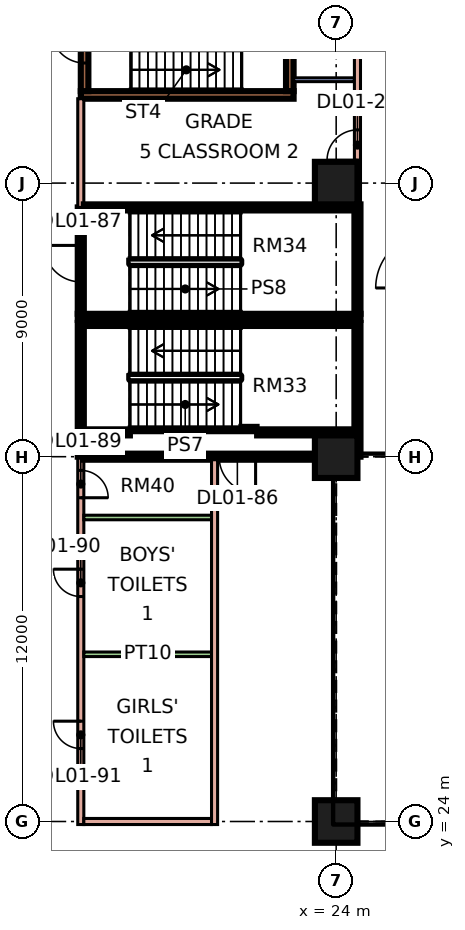
"""IFC4 building model, lengths in metres.
Left out: names, types, materials, properties, quantities, classifications, styles, units other than length and angle.
Written with IfcOpenShell. Run it as: python <this file> out.ifc"""

import sys

from ifc_helpers import new_model, si_unit, direction, frame, frame_2d, origin, origin_2d, place, context, subcontext, project, spatial, rectangle, extrude, element, fill, save


model = new_model("IFC4")
c1 = context("Model", 3, precision=1e-05, world=origin(), true_north=direction((0.0, 1.0)))
c2 = subcontext(c1, "Body", "Model", "MODEL_VIEW")
j1 = project(units=[si_unit("LENGTHUNIT", "METRE"), si_unit("PLANEANGLEUNIT", "RADIAN")], contexts=[c1])
p1 = place(None, origin())
s1 = spatial("IfcSite", under=j1, at=p1, CompositionType="ELEMENT")
p2 = place(p1, origin())
s2 = spatial("IfcBuilding", under=s1, at=p2, CompositionType="ELEMENT")
p3 = place(p2, frame((0.0, 0.0, 7.2)))
s3 = spatial("IfcBuildingStorey", under=s2, at=p3, CompositionType="ELEMENT", Elevation=7.2)
for number, where, z_axis, x_axis in (
    (1, (24.0, 24.0, 0.0), (0.0, 0.0, 1.0), (1.0, 0.0, 0.0)),
    (2, (24.0, 36.0, 0.0), (0.0, 0.0, 1.0), (1.0, 0.0, 0.0)),
    (3, (24.0, 45.0, 0.0), (0.0, 0.0, 1.0), (1.0, 0.0, 0.0)),
):
    element("IfcColumn", number, at=place(p3, frame(where, z_axis=z_axis, x_axis=x_axis)), inside=s3, PredefinedType="COLUMN", context=c2, shape_type="SweptSolid", body=[
        extrude(rectangle(XDim=1.4, YDim=1.4, at=origin_2d()), origin(), (0.0, 0.0, 1.0), 4.8),
    ])
p4 = place(p3, frame((15.6, 47.9, 0.0), z_axis=(0.0, 0.0, 1.0), x_axis=(1.0, 0.0, 0.0)))
e4 = element("IfcWall", 4, at=p4, inside=s3, PredefinedType="SHEAR", context=c2, shape_type="SweptSolid", body=[
    extrude(rectangle(XDim=7.0, YDim=0.25, at=frame_2d((3.5, 0.0))), origin(), (0.0, 0.0, 1.0), 4.8),
])
p5 = place(p3, frame((15.725, 48.025, 0.0), z_axis=(0.0, 0.0, 1.0), x_axis=(0.0, 1.0, 0.0)))
e5 = element("IfcWall", 5, at=p5, inside=s3, PredefinedType="SHEAR", context=c2, shape_type="SweptSolid", body=[
    extrude(rectangle(XDim=2.95, YDim=0.25, at=frame_2d((1.475, 0.0))), origin(), (0.0, 0.0, 1.0), 4.8),
])
p6 = place(p5, frame((0.925, 0.0, 0.0)))
e6 = element("IfcOpeningElement", 6, at=p6, cuts=e5, PredefinedType="OPENING", context=c2, shape_type="SweptSolid", body=[
    extrude(rectangle(XDim=1.1, YDim=2.2, at=frame_2d((0.55, 1.1))), frame((0.0, 0.135, 0.0), z_axis=(0.0, -1.0, 0.0), x_axis=(1.0, 0.0, 0.0)), (0.0, 0.0, 1.0), 0.27),
])
p7 = place(p3, frame((22.475, 48.025, 0.0), z_axis=(0.0, 0.0, 1.0), x_axis=(0.0, 1.0, 0.0)))
e7 = element("IfcWall", 7, at=p7, inside=s3, PredefinedType="SHEAR", context=c2, shape_type="SweptSolid", body=[
    extrude(rectangle(XDim=2.95, YDim=0.25, at=frame_2d((1.475, 0.0))), origin(), (0.0, 0.0, 1.0), 4.8),
])
p8 = place(p3, frame((15.5, 40.6, 0.0), z_axis=(0.0, 0.0, 1.0), x_axis=(1.0, 0.0, 0.0)))
e8 = element("IfcWall", 8, at=p8, inside=s3, PredefinedType="SOLIDWALL", context=c2, shape_type="SweptSolid", body=[
    extrude(rectangle(XDim=9.3, YDim=0.2, at=frame_2d((4.65, 0.0))), origin(), (0.0, 0.0, 1.0), 4.4),
])
p9 = place(p3, frame((15.6, 23.9, 0.0), z_axis=(0.0, 0.0, 1.0), x_axis=(0.0, 1.0, 0.0)))
e9 = element("IfcWall", 9, at=p9, inside=s3, PredefinedType="PARTITIONING", context=c2, shape_type="SweptSolid", body=[
    extrude(rectangle(XDim=12.1, YDim=0.2, at=frame_2d((6.05, 0.0))), origin(), (0.0, 0.0, 1.0), 4.4),
])
p10 = place(p9, frame((10.75, 0.0, 0.0)))
e10 = element("IfcOpeningElement", 10, at=p10, cuts=e9, PredefinedType="OPENING", context=c2, shape_type="SweptSolid", body=[
    extrude(rectangle(XDim=0.9, YDim=2.1, at=frame_2d((0.45, 1.05))), frame((0.0, 0.11, 0.0), z_axis=(0.0, -1.0, 0.0), x_axis=(1.0, 0.0, 0.0)), (0.0, 0.0, 1.0), 0.22),
])
p11 = place(p9, frame((7.5, 0.0, 0.0)))
e11 = element("IfcOpeningElement", 11, at=p11, cuts=e9, PredefinedType="OPENING", context=c2, shape_type="SweptSolid", body=[
    extrude(rectangle(XDim=0.9, YDim=2.1, at=frame_2d((0.45, 1.05))), frame((0.0, 0.11, 0.0), z_axis=(0.0, -1.0, 0.0), x_axis=(1.0, 0.0, 0.0)), (0.0, 0.0, 1.0), 0.22),
])
p12 = place(p9, frame((2.5, 0.0, 0.0)))
e12 = element("IfcOpeningElement", 12, at=p12, cuts=e9, PredefinedType="OPENING", context=c2, shape_type="SweptSolid", body=[
    extrude(rectangle(XDim=0.9, YDim=2.1, at=frame_2d((0.45, 1.05))), frame((0.0, 0.11, 0.0), z_axis=(0.0, -1.0, 0.0), x_axis=(1.0, 0.0, 0.0)), (0.0, 0.0, 1.0), 0.22),
])
p13 = place(p3, frame((15.6, 36.0, 0.0), z_axis=(0.0, 0.0, 1.0), x_axis=(0.0, 1.0, 0.0)))
e13 = element("IfcWall", 13, at=p13, inside=s3, PredefinedType="SOLIDWALL", context=c2, shape_type="SweptSolid", body=[
    extrude(rectangle(XDim=4.4, YDim=0.2, at=frame_2d((2.2, 0.0))), origin(), (0.0, 0.0, 1.0), 4.4),
])
p14 = place(p3, frame((15.6, 40.7, 0.0), z_axis=(0.0, 0.0, 1.0), x_axis=(0.0, 1.0, 0.0)))
e14 = element("IfcWall", 14, at=p14, inside=s3, PredefinedType="SOLIDWALL", context=c2, shape_type="SweptSolid", body=[
    extrude(rectangle(XDim=3.5, YDim=0.2, at=frame_2d((1.75, 0.0))), origin(), (0.0, 0.0, 1.0), 4.4),
])
p15 = place(p14, frame((1.05, 0.0, 0.0)))
e15 = element("IfcOpeningElement", 15, at=p15, cuts=e14, PredefinedType="OPENING", context=c2, shape_type="SweptSolid", body=[
    extrude(rectangle(XDim=1.2, YDim=2.1, at=frame_2d((0.6, 1.05))), frame((0.0, 0.11, 0.0), z_axis=(0.0, -1.0, 0.0), x_axis=(1.0, 0.0, 0.0)), (0.0, 0.0, 1.0), 0.22),
])
p16 = place(p3, frame((15.6, 44.2, 0.0), z_axis=(0.0, 0.0, 1.0), x_axis=(0.0, 1.0, 0.0)))
e16 = element("IfcWall", 16, at=p16, inside=s3, PredefinedType="PARTITIONING", context=c2, shape_type="SweptSolid", body=[
    extrude(rectangle(XDim=3.575, YDim=0.2, at=frame_2d((1.788, 0.0))), origin(), (0.0, 0.0, 1.0), 4.4),
])
p17 = place(p3, frame((15.7, 24.0, 0.0), z_axis=(0.0, 0.0, 1.0), x_axis=(1.0, 0.0, 0.0)))
e17 = element("IfcWall", 17, at=p17, inside=s3, PredefinedType="PARTITIONING", context=c2, shape_type="SweptSolid", body=[
    extrude(rectangle(XDim=4.2, YDim=0.2, at=frame_2d((2.1, 0.0))), origin(), (0.0, 0.0, 1.0), 4.4),
])
for number, where, z_axis, x_axis in (
    (18, (15.7, 29.5, 0.0), (0.0, 0.0, 1.0), (1.0, 0.0, 0.0)),
    (19, (15.7, 34.0, 0.0), (0.0, 0.0, 1.0), (1.0, 0.0, 0.0)),
):
    element("IfcWall", number, at=place(p3, frame(where, z_axis=z_axis, x_axis=x_axis)), inside=s3, PredefinedType="PARTITIONING", context=c2, shape_type="SweptSolid", body=[
        extrude(rectangle(XDim=4.2, YDim=0.15, at=frame_2d((2.1, 0.0))), origin(), (0.0, 0.0, 1.0), 4.4),
    ])
p18 = place(p3, frame((15.7, 36.0, 0.0), z_axis=(0.0, 0.0, 1.0), x_axis=(1.0, 0.0, 0.0)))
e20 = element("IfcWall", 20, at=p18, inside=s3, PredefinedType="SOLIDWALL", context=c2, shape_type="SweptSolid", body=[
    extrude(rectangle(XDim=8.3, YDim=0.2, at=frame_2d((4.15, 0.0))), origin(), (0.0, 0.0, 1.0), 4.4),
])
p19 = place(p18, frame((4.45, 0.0, 0.0)))
e21 = element("IfcOpeningElement", 21, at=p19, cuts=e20, PredefinedType="OPENING", context=c2, shape_type="SweptSolid", body=[
    extrude(rectangle(XDim=1.2, YDim=2.1, at=frame_2d((0.6, 1.05))), frame((0.0, 0.11, 0.0), z_axis=(0.0, -1.0, 0.0), x_axis=(1.0, 0.0, 0.0)), (0.0, 0.0, 1.0), 0.22),
])
p20 = place(p3, frame((15.7, 44.2, 0.0), z_axis=(0.0, 0.0, 1.0), x_axis=(1.0, 0.0, 0.0)))
e22 = element("IfcWall", 22, at=p20, inside=s3, PredefinedType="SOLIDWALL", context=c2, shape_type="SweptSolid", body=[
    extrude(rectangle(XDim=8.9, YDim=0.2, at=frame_2d((4.45, 0.0))), origin(), (0.0, 0.0, 1.0), 4.4),
])
p21 = place(p3, frame((20.0, 23.9, 0.0), z_axis=(0.0, 0.0, 1.0), x_axis=(0.0, 1.0, 0.0)))
e23 = element("IfcWall", 23, at=p21, inside=s3, PredefinedType="PARTITIONING", context=c2, shape_type="SweptSolid", body=[
    extrude(rectangle(XDim=12.0, YDim=0.2, at=frame_2d((6.0, 0.0))), origin(), (0.0, 0.0, 1.0), 4.4),
])
p22 = place(p3, frame((22.6, 48.4, 0.0), z_axis=(0.0, 0.0, 1.0), x_axis=(1.0, 0.0, 0.0)))
e24 = element("IfcWall", 24, at=p22, inside=s3, PredefinedType="PARTITIONING", context=c2, shape_type="SweptSolid", body=[
    extrude(rectangle(XDim=2.0, YDim=0.125, at=frame_2d((1.0, 0.0))), origin(), (0.0, 0.0, 1.0), 4.4),
])
p23 = place(p3, frame((24.7, 36.0, 0.0), z_axis=(0.0, 0.0, 1.0), x_axis=(0.0, 1.0, 0.0)))
e25 = element("IfcWall", 25, at=p23, inside=s3, PredefinedType="SOLIDWALL", context=c2, shape_type="SweptSolid", body=[
    extrude(rectangle(XDim=4.4, YDim=0.2, at=frame_2d((2.2, 0.0))), origin(), (0.0, 0.0, 1.0), 4.4),
])
p24 = place(p3, frame((24.7, 40.7, 0.0), z_axis=(0.0, 0.0, 1.0), x_axis=(0.0, 1.0, 0.0)))
e26 = element("IfcWall", 26, at=p24, inside=s3, PredefinedType="SOLIDWALL", context=c2, shape_type="SweptSolid", body=[
    extrude(rectangle(XDim=3.6, YDim=0.2, at=frame_2d((1.8, 0.0))), origin(), (0.0, 0.0, 1.0), 4.4),
])
p25 = place(p3, frame((24.7, 44.3, 0.0), z_axis=(0.0, 0.0, 1.0), x_axis=(0.0, 1.0, 0.0)))
e27 = element("IfcWall", 27, at=p25, inside=s3, PredefinedType="PARTITIONING", context=c2, shape_type="SweptSolid", body=[
    extrude(rectangle(XDim=19.5, YDim=0.2, at=frame_2d((9.75, 0.0))), origin(), (0.0, 0.0, 1.0), 4.4),
])
p26 = place(p25, frame((1.45, 0.0, 0.0)))
e28 = element("IfcOpeningElement", 28, at=p26, cuts=e27, PredefinedType="OPENING", context=c2, shape_type="SweptSolid", body=[
    extrude(rectangle(XDim=1.0, YDim=2.1, at=frame_2d((0.5, 1.05))), frame((0.0, 0.11, 0.0), z_axis=(0.0, -1.0, 0.0), x_axis=(1.0, 0.0, 0.0)), (0.0, 0.0, 1.0), 0.22),
])
p27 = place(p25, frame((6.65, 0.0, 0.0)))
e29 = element("IfcOpeningElement", 29, at=p27, cuts=e27, PredefinedType="OPENING", context=c2, shape_type="SweptSolid", body=[
    extrude(rectangle(XDim=1.0, YDim=2.1, at=frame_2d((0.5, 1.05))), frame((0.0, 0.11, 0.0), z_axis=(0.0, -1.0, 0.0), x_axis=(1.0, 0.0, 0.0)), (0.0, 0.0, 1.0), 0.22),
])
p28 = place(p3, frame((21.4, 36.8, 0.0), z_axis=(0.0, 0.0, 1.0), x_axis=(1.0, 0.0, 0.0)))
e30 = element("IfcWall", 30, at=p28, inside=s3, PredefinedType="SOLIDWALL", context=c2, shape_type="SweptSolid", body=[
    extrude(rectangle(XDim=3.2, YDim=0.2, at=frame_2d((1.6, 0.0))), origin(), (0.0, 0.0, 1.0), 4.4),
])
p29 = place(p3, frame((20.855, 40.4, 0.0), z_axis=(0.0, 0.0, 1.0), x_axis=(1.0, 0.0, 0.0)))
e31 = element("IfcWall", 31, at=p29, inside=s3, PredefinedType="SOLIDWALL", context=c2, shape_type="SweptSolid", body=[
    extrude(rectangle(XDim=3.745, YDim=0.2, at=frame_2d((1.873, 0.0))), origin(), (0.0, 0.0, 1.0), 4.4),
])
for number, where, z_axis, x_axis in (
    (32, (15.7, 36.8, 0.0), (0.0, 0.0, 1.0), (1.0, 0.0, 0.0)),
    (33, (15.7, 40.4, 0.0), (0.0, 0.0, 1.0), (1.0, 0.0, 0.0)),
):
    element("IfcWall", number, at=place(p3, frame(where, z_axis=z_axis, x_axis=x_axis)), inside=s3, PredefinedType="SOLIDWALL", context=c2, shape_type="SweptSolid", body=[
        extrude(rectangle(XDim=1.515, YDim=0.2, at=frame_2d((0.758, 0.0))), origin(), (0.0, 0.0, 1.0), 4.4),
    ])
p30 = place(p6, frame((1.1, 0.0, 0.0), z_axis=(0.0, 0.0, 1.0), x_axis=(-1.0, 0.0, 0.0)))
e34 = element("IfcDoor", 34, at=p30, inside=s3, OperationType="SINGLE_SWING_RIGHT", PredefinedType="DOOR", context=c2, shape_type="SweptSolid", body=[
    extrude(rectangle(XDim=1.1, YDim=2.2, at=frame_2d((0.55, 1.1))), frame((0.0, 0.025, 0.0), z_axis=(0.0, -1.0, 0.0), x_axis=(1.0, 0.0, 0.0)), (0.0, 0.0, 1.0), 0.05),
])
fill(e6, e34)
p31 = place(p26, origin())
e35 = element("IfcDoor", 35, at=p31, inside=s3, OperationType="SINGLE_SWING_LEFT", PredefinedType="DOOR", context=c2, shape_type="SweptSolid", body=[
    extrude(rectangle(XDim=1.0, YDim=2.1, at=frame_2d((0.5, 1.05))), frame((0.0, 0.025, 0.0), z_axis=(0.0, -1.0, 0.0), x_axis=(1.0, 0.0, 0.0)), (0.0, 0.0, 1.0), 0.05),
])
fill(e28, e35)
p32 = place(p19, origin())
e36 = element("IfcDoor", 36, at=p32, inside=s3, OperationType="SINGLE_SWING_RIGHT", PredefinedType="DOOR", context=c2, shape_type="SweptSolid", body=[
    extrude(rectangle(XDim=1.2, YDim=2.1, at=frame_2d((0.6, 1.05))), frame((0.0, 0.025, 0.0), z_axis=(0.0, -1.0, 0.0), x_axis=(1.0, 0.0, 0.0)), (0.0, 0.0, 1.0), 0.05),
])
fill(e21, e36)
p33 = place(p15, frame((1.2, 0.0, 0.0), z_axis=(0.0, 0.0, 1.0), x_axis=(-1.0, 0.0, 0.0)))
e37 = element("IfcDoor", 37, at=p33, inside=s3, OperationType="SINGLE_SWING_RIGHT", PredefinedType="DOOR", context=c2, shape_type="SweptSolid", body=[
    extrude(rectangle(XDim=1.2, YDim=2.1, at=frame_2d((0.6, 1.05))), frame((0.0, 0.025, 0.0), z_axis=(0.0, -1.0, 0.0), x_axis=(1.0, 0.0, 0.0)), (0.0, 0.0, 1.0), 0.05),
])
fill(e15, e37)
p34 = place(p10, frame((0.9, 0.0, 0.0), z_axis=(0.0, 0.0, 1.0), x_axis=(-1.0, 0.0, 0.0)))
e38 = element("IfcDoor", 38, at=p34, inside=s3, OperationType="SINGLE_SWING_LEFT", PredefinedType="DOOR", context=c2, shape_type="SweptSolid", body=[
    extrude(rectangle(XDim=0.9, YDim=2.1, at=frame_2d((0.45, 1.05))), frame((0.0, 0.025, 0.0), z_axis=(0.0, -1.0, 0.0), x_axis=(1.0, 0.0, 0.0)), (0.0, 0.0, 1.0), 0.05),
])
fill(e10, e38)
p35 = place(p11, frame((0.9, 0.0, 0.0), z_axis=(0.0, 0.0, 1.0), x_axis=(-1.0, 0.0, 0.0)))
e39 = element("IfcDoor", 39, at=p35, inside=s3, OperationType="SINGLE_SWING_RIGHT", PredefinedType="DOOR", context=c2, shape_type="SweptSolid", body=[
    extrude(rectangle(XDim=0.9, YDim=2.1, at=frame_2d((0.45, 1.05))), frame((0.0, 0.025, 0.0), z_axis=(0.0, -1.0, 0.0), x_axis=(1.0, 0.0, 0.0)), (0.0, 0.0, 1.0), 0.05),
])
fill(e11, e39)
p36 = place(p12, frame((0.9, 0.0, 0.0), z_axis=(0.0, 0.0, 1.0), x_axis=(-1.0, 0.0, 0.0)))
e40 = element("IfcDoor", 40, at=p36, inside=s3, OperationType="SINGLE_SWING_RIGHT", PredefinedType="DOOR", context=c2, shape_type="SweptSolid", body=[
    extrude(rectangle(XDim=0.9, YDim=2.1, at=frame_2d((0.45, 1.05))), frame((0.0, 0.025, 0.0), z_axis=(0.0, -1.0, 0.0), x_axis=(1.0, 0.0, 0.0)), (0.0, 0.0, 1.0), 0.05),
])
fill(e12, e40)
save(model, sys.argv[1])
